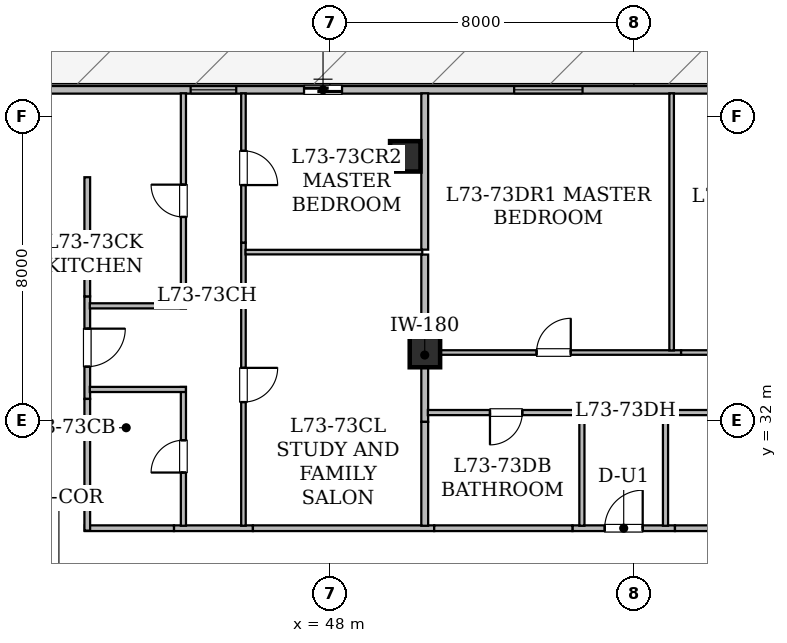
"""IFC4 building model, lengths in metres.
Left out: names, types, materials, properties, quantities, classifications, styles, units other than length and angle.
Written with IfcOpenShell. Run it as: python <this file> out.ifc"""

import sys

from ifc_helpers import new_model, si_unit, direction, frame, frame_2d, origin, origin_2d, place, context, subcontext, project, spatial, rectangle, hollow_rectangle, extrude, element, fill, save


model = new_model("IFC4")
c1 = context("Model", 3, precision=1e-05, world=origin(), true_north=direction((0.0, 1.0)))
c2 = subcontext(c1, "Body", "Model", "MODEL_VIEW")
j1 = project(units=[si_unit("LENGTHUNIT", "METRE"), si_unit("PLANEANGLEUNIT", "RADIAN")], contexts=[c1])
p1 = place(None, origin())
s1 = spatial("IfcSite", under=j1, at=p1, CompositionType="ELEMENT")
p2 = place(p1, origin())
s2 = spatial("IfcBuilding", under=s1, at=p2, CompositionType="ELEMENT")
p3 = place(p2, frame((0.0, 0.0, 286.25)))
s3 = spatial("IfcBuildingStorey", under=s2, at=p3, CompositionType="ELEMENT", Elevation=286.25)
p4 = place(p3, frame((49.983, 38.95, 0.025), z_axis=(0.0, 0.0, 1.0), x_axis=(1.0, 0.0, 0.0)))
e1 = element("IfcColumn", 1, at=p4, inside=s3, PredefinedType="COLUMN", context=c2, shape_type="SweptSolid", body=[
    extrude(hollow_rectangle(XDim=0.8, YDim=0.8, WallThickness=0.04, at=origin_2d()), origin(), (0.0, 0.0, 1.0), 4.175),
])
p5 = place(p3, frame((50.5, 33.8, 0.0), z_axis=(0.0, 0.0, 1.0), x_axis=(1.0, 0.0, 0.0)))
e2 = element("IfcColumn", 2, at=p5, inside=s3, PredefinedType="COLUMN", context=c2, shape_type="SweptSolid", body=[
    extrude(hollow_rectangle(XDim=0.8, YDim=0.8, WallThickness=0.04, at=origin_2d()), origin(), (0.0, 0.0, 1.0), 4.2),
])
p6 = place(p3, frame((28.302, 40.7, 0.0), z_axis=(0.0, 0.0, 1.0), x_axis=(1.0, 0.0, 0.0)))
e3 = element("IfcWall", 3, at=p6, inside=s3, PredefinedType="STANDARD", context=c2, shape_type="SweptSolid", body=[
    extrude(rectangle(XDim=33.457, YDim=0.2, at=frame_2d((16.729, 0.0))), origin(), (0.0, 0.0, 1.0), 3.95),
])
p7 = place(p6, frame((19.017, 0.0, 0.0)))
e4 = element("IfcOpeningElement", 4, at=p7, cuts=e3, PredefinedType="OPENING", context=c2, shape_type="SweptSolid", body=[
    extrude(rectangle(XDim=1.0, YDim=2.15, at=frame_2d((0.5, 1.075))), frame((0.0, 0.11, 0.0), z_axis=(0.0, -1.0, 0.0), x_axis=(1.0, 0.0, 0.0)), (0.0, 0.0, 1.0), 0.22),
])
p8 = place(p6, frame((16.033, 0.0, 0.78)))
e5 = element("IfcOpeningElement", 5, at=p8, cuts=e3, PredefinedType="OPENING", context=c2, shape_type="SweptSolid", body=[
    extrude(rectangle(XDim=1.2, YDim=1.5, at=frame_2d((0.6, 0.75))), frame((0.0, 0.11, 0.0), z_axis=(0.0, -1.0, 0.0), x_axis=(1.0, 0.0, 0.0)), (0.0, 0.0, 1.0), 0.22),
])
p9 = place(p6, frame((24.546, 0.0, 0.85)))
e6 = element("IfcOpeningElement", 6, at=p9, cuts=e3, PredefinedType="OPENING", context=c2, shape_type="SweptSolid", body=[
    extrude(rectangle(XDim=1.8, YDim=0.92, at=frame_2d((0.9, 0.46))), frame((0.0, 0.11, 0.0), z_axis=(0.0, -1.0, 0.0), x_axis=(1.0, 0.0, 0.0)), (0.0, 0.0, 1.0), 0.22),
])
p10 = place(p6, frame((29.781, 0.0, 0.85)))
e7 = element("IfcOpeningElement", 7, at=p10, cuts=e3, PredefinedType="OPENING", context=c2, shape_type="SweptSolid", body=[
    extrude(rectangle(XDim=1.8, YDim=0.92, at=frame_2d((0.9, 0.46))), frame((0.0, 0.11, 0.0), z_axis=(0.0, -1.0, 0.0), x_axis=(1.0, 0.0, 0.0)), (0.0, 0.0, 1.0), 0.22),
])
p11 = place(p3, frame((43.896, 29.165, 0.0), z_axis=(0.0, 0.0, 1.0), x_axis=(1.0, 0.0, 0.0)))
e8 = element("IfcWall", 8, at=p11, inside=s3, PredefinedType="STANDARD", context=c2, shape_type="SweptSolid", body=[
    extrude(rectangle(XDim=2.078, YDim=0.15, at=frame_2d((1.039, 0.0))), origin(), (0.0, 0.0, 1.0), 3.95),
])
p12 = place(p3, frame((41.615, 35.265, 0.0), z_axis=(0.0, 0.0, 1.0), x_axis=(0.0, -1.0, 0.0)))
e9 = element("IfcWall", 9, at=p12, inside=s3, PredefinedType="STANDARD", context=c2, shape_type="SweptSolid", body=[
    extrude(rectangle(XDim=2.698, YDim=0.15, at=frame_2d((1.349, 0.0))), origin(), (0.0, 0.0, 1.0), 3.95),
])
p13 = place(p12, frame((0.849, 0.0, 0.0)))
e10 = element("IfcOpeningElement", 10, at=p13, cuts=e9, PredefinedType="OPENING", context=c2, shape_type="SweptSolid", body=[
    extrude(rectangle(XDim=1.0, YDim=2.15, at=frame_2d((0.5, 1.075))), frame((0.0, 0.085, 0.0), z_axis=(0.0, -1.0, 0.0), x_axis=(1.0, 0.0, 0.0)), (0.0, 0.0, 1.0), 0.17),
])
p14 = place(p3, frame((41.55, 29.165, 0.0), z_axis=(0.0, 0.0, 1.0), x_axis=(1.0, 0.0, 0.0)))
e11 = element("IfcWall", 11, at=p14, inside=s3, PredefinedType="STANDARD", context=c2, shape_type="SweptSolid", body=[
    extrude(rectangle(XDim=2.346, YDim=0.15, at=frame_2d((1.173, 0.0))), origin(), (0.0, 0.0, 1.0), 3.95),
])
p15 = place(p3, frame((41.615, 32.567, 0.0), z_axis=(0.0, 0.0, 1.0), x_axis=(0.0, -1.0, 0.0)))
e12 = element("IfcWall", 12, at=p15, inside=s3, PredefinedType="STANDARD", context=c2, shape_type="SweptSolid", body=[
    extrude(rectangle(XDim=3.465, YDim=0.15, at=frame_2d((1.732, 0.0))), origin(), (0.0, 0.0, 1.0), 3.95),
])
p16 = place(p3, frame((41.615, 38.4, 0.0), z_axis=(0.0, 0.0, 1.0), x_axis=(0.0, -1.0, 0.0)))
e13 = element("IfcWall", 13, at=p16, inside=s3, PredefinedType="STANDARD", context=c2, shape_type="SweptSolid", body=[
    extrude(rectangle(XDim=3.135, YDim=0.15, at=frame_2d((1.567, 0.0))), origin(), (0.0, 0.0, 1.0), 3.245),
])
p17 = place(p3, frame((45.974, 29.165, 0.0), z_axis=(0.0, 0.0, 1.0), x_axis=(1.0, 0.0, 0.0)))
e14 = element("IfcWall", 14, at=p17, inside=s3, PredefinedType="STANDARD", context=c2, shape_type="SweptSolid", body=[
    extrude(rectangle(XDim=4.77, YDim=0.15, at=frame_2d((2.385, 0.0))), origin(), (0.0, 0.0, 1.0), 3.245),
])
p18 = place(p3, frame((54.382, 29.165, 0.0), z_axis=(0.0, 0.0, 1.0), x_axis=(1.0, 0.0, 0.0)))
e15 = element("IfcWall", 15, at=p18, inside=s3, PredefinedType="STANDARD", context=c2, shape_type="SweptSolid", body=[
    extrude(rectangle(XDim=2.698, YDim=0.15, at=frame_2d((1.349, 0.0))), origin(), (0.0, 0.0, 1.0), 3.95),
])
p19 = place(p18, frame((0.849, 0.0, 0.0)))
e16 = element("IfcOpeningElement", 16, at=p19, cuts=e15, PredefinedType="OPENING", context=c2, shape_type="SweptSolid", body=[
    extrude(rectangle(XDim=1.0, YDim=2.15, at=frame_2d((0.5, 1.075))), frame((0.0, 0.085, 0.0), z_axis=(0.0, -1.0, 0.0), x_axis=(1.0, 0.0, 0.0)), (0.0, 0.0, 1.0), 0.17),
])
p20 = place(p3, frame((50.744, 29.165, 0.0), z_axis=(0.0, 0.0, 1.0), x_axis=(1.0, 0.0, 0.0)))
e17 = element("IfcWall", 17, at=p20, inside=s3, PredefinedType="STANDARD", context=c2, shape_type="SweptSolid", body=[
    extrude(rectangle(XDim=3.638, YDim=0.15, at=frame_2d((1.819, 0.0))), origin(), (0.0, 0.0, 1.0), 3.95),
])
p21 = place(p3, frame((57.08, 29.165, 0.0), z_axis=(0.0, 0.0, 1.0), x_axis=(1.0, 0.0, 0.0)))
e18 = element("IfcWall", 18, at=p21, inside=s3, PredefinedType="STANDARD", context=c2, shape_type="SweptSolid", body=[
    extrude(rectangle(XDim=3.61, YDim=0.15, at=frame_2d((1.805, 0.0))), origin(), (0.0, 0.0, 1.0), 3.95),
])
p22 = place(p3, frame((44.145, 29.23, 0.0), z_axis=(0.0, 0.0, 1.0), x_axis=(0.0, 1.0, 0.0)))
e19 = element("IfcWall", 19, at=p22, inside=s3, PredefinedType="PARTITIONING", context=c2, shape_type="SweptSolid", body=[
    extrude(rectangle(XDim=3.651, YDim=0.135, at=frame_2d((1.826, 0.0))), origin(), (0.0, 0.0, 1.0), 3.95),
])
p23 = place(p22, frame((1.4, 0.0, 0.0)))
e20 = element("IfcOpeningElement", 20, at=p23, cuts=e19, PredefinedType="OPENING", context=c2, shape_type="SweptSolid", body=[
    extrude(rectangle(XDim=0.85, YDim=2.1, at=frame_2d((0.425, 1.05))), frame((0.0, 0.077, 0.0), z_axis=(0.0, -1.0, 0.0), x_axis=(1.0, 0.0, 0.0)), (0.0, 0.0, 1.0), 0.155),
])
for number, where, z_axis, x_axis in (
    (21, (44.21, 32.816, 0.0), (0.0, 0.0, 1.0), (-1.0, 0.0, 0.0)),
    (22, (41.682, 35.016, 0.0), (0.0, 0.0, 1.0), (1.0, 0.0, 0.0)),
):
    element("IfcWall", number, at=place(p3, frame(where, z_axis=z_axis, x_axis=x_axis)), inside=s3, PredefinedType="PARTITIONING", context=c2, shape_type="SweptSolid", body=[
        extrude(rectangle(XDim=2.528, YDim=0.135, at=frame_2d((1.264, 0.0))), origin(), (0.0, 0.0, 1.0), 3.95),
    ])
p24 = place(p3, frame((44.145, 34.951, 0.0), z_axis=(0.0, 0.0, 1.0), x_axis=(0.0, 1.0, 0.0)))
e23 = element("IfcWall", 23, at=p24, inside=s3, PredefinedType="PARTITIONING", context=c2, shape_type="SweptSolid", body=[
    extrude(rectangle(XDim=5.657, YDim=0.135, at=frame_2d((2.829, 0.0))), origin(), (0.0, 0.0, 1.0), 3.245),
])
p25 = place(p24, frame((2.404, 0.0, 0.0)))
e24 = element("IfcOpeningElement", 24, at=p25, cuts=e23, PredefinedType="OPENING", context=c2, shape_type="SweptSolid", body=[
    extrude(rectangle(XDim=0.85, YDim=2.1, at=frame_2d((0.425, 1.05))), frame((0.0, 0.077, 0.0), z_axis=(0.0, -1.0, 0.0), x_axis=(1.0, 0.0, 0.0)), (0.0, 0.0, 1.0), 0.155),
])
p26 = place(p3, frame((45.725, 36.679, 0.0), z_axis=(0.0, 0.0, 1.0), x_axis=(0.0, -1.0, 0.0)))
e25 = element("IfcWall", 25, at=p26, inside=s3, PredefinedType="PARTITIONING", context=c2, shape_type="SweptSolid", body=[
    extrude(rectangle(XDim=7.449, YDim=0.12, at=frame_2d((3.725, 0.0))), origin(), (0.0, 0.0, 1.0), 3.245),
])
p27 = place(p26, frame((3.295, 0.0, 0.0)))
e26 = element("IfcOpeningElement", 26, at=p27, cuts=e25, PredefinedType="OPENING", context=c2, shape_type="SweptSolid", body=[
    extrude(rectangle(XDim=0.9, YDim=2.1, at=frame_2d((0.45, 1.05))), frame((0.0, 0.07, 0.0), z_axis=(0.0, -1.0, 0.0), x_axis=(1.0, 0.0, 0.0)), (0.0, 0.0, 1.0), 0.14),
])
p28 = place(p3, frame((45.725, 40.608, 0.0), z_axis=(0.0, 0.0, 1.0), x_axis=(0.0, -1.0, 0.0)))
e27 = element("IfcWall", 27, at=p28, inside=s3, PredefinedType="PARTITIONING", context=c2, shape_type="SweptSolid", body=[
    extrude(rectangle(XDim=3.929, YDim=0.12, at=frame_2d((1.964, 0.0))), origin(), (0.0, 0.0, 1.0), 3.407),
])
p29 = place(p28, frame((1.514, 0.0, 0.0)))
e28 = element("IfcOpeningElement", 28, at=p29, cuts=e27, PredefinedType="OPENING", context=c2, shape_type="SweptSolid", body=[
    extrude(rectangle(XDim=0.9, YDim=2.1, at=frame_2d((0.45, 1.05))), frame((0.0, 0.07, 0.0), z_axis=(0.0, -1.0, 0.0), x_axis=(1.0, 0.0, 0.0)), (0.0, 0.0, 1.0), 0.14),
])
p30 = place(p3, frame((45.779, 36.43, 0.0), z_axis=(0.0, 0.0, 1.0), x_axis=(1.0, 0.0, 0.0)))
e29 = element("IfcWall", 29, at=p30, inside=s3, PredefinedType="PARTITIONING", context=c2, shape_type="SweptSolid", body=[
    extrude(rectangle(XDim=4.651, YDim=0.12, at=frame_2d((2.325, 0.0))), origin(), (0.0, 0.0, 1.0), 3.245),
])
p31 = place(p3, frame((50.495, 34.032, 0.0), z_axis=(0.0, 0.0, 1.0), x_axis=(0.0, -1.0, 0.0)))
e30 = element("IfcWall", 30, at=p31, inside=s3, PredefinedType="STANDARD", context=c2, shape_type="SweptSolid", body=[
    extrude(rectangle(XDim=2.069, YDim=0.18, at=frame_2d((1.035, 0.0))), origin(), (0.0, 0.0, 1.0), 3.245),
])
p32 = place(p3, frame((50.495, 31.963, 0.0), z_axis=(0.0, 0.0, 1.0), x_axis=(0.0, -1.0, 0.0)))
e31 = element("IfcWall", 31, at=p32, inside=s3, PredefinedType="STANDARD", context=c2, shape_type="SweptSolid", body=[
    extrude(rectangle(XDim=2.733, YDim=0.18, at=frame_2d((1.366, 0.0))), origin(), (0.0, 0.0, 1.0), 3.245),
])
p33 = place(p3, frame((50.495, 36.365, 0.0), z_axis=(0.0, 0.0, 1.0), x_axis=(0.0, -1.0, 0.0)))
e32 = element("IfcWall", 32, at=p33, inside=s3, PredefinedType="STANDARD", context=c2, shape_type="SweptSolid", body=[
    extrude(rectangle(XDim=2.333, YDim=0.18, at=frame_2d((1.167, 0.0))), origin(), (0.0, 0.0, 1.0), 3.245),
])
p34 = place(p3, frame((50.495, 40.608, 0.0), z_axis=(0.0, 0.0, 1.0), x_axis=(0.0, -1.0, 0.0)))
e33 = element("IfcWall", 33, at=p34, inside=s3, PredefinedType="STANDARD", context=c2, shape_type="SweptSolid", body=[
    extrude(rectangle(XDim=4.113, YDim=0.18, at=frame_2d((2.056, 0.0))), origin(), (0.0, 0.0, 1.0), 3.245),
])
p35 = place(p3, frame((54.631, 29.23, 0.0), z_axis=(0.0, 0.0, 1.0), x_axis=(0.0, 1.0, 0.0)))
e34 = element("IfcWall", 34, at=p35, inside=s3, PredefinedType="PARTITIONING", context=c2, shape_type="SweptSolid", body=[
    extrude(rectangle(XDim=3.043, YDim=0.135, at=frame_2d((1.521, 0.0))), origin(), (0.0, 0.0, 1.0), 3.95),
])
p36 = place(p3, frame((54.696, 32.208, 0.0), z_axis=(0.0, 0.0, 1.0), x_axis=(-1.0, 0.0, 0.0)))
e35 = element("IfcWall", 35, at=p36, inside=s3, PredefinedType="PARTITIONING", context=c2, shape_type="SweptSolid", body=[
    extrude(rectangle(XDim=4.119, YDim=0.135, at=frame_2d((2.06, 0.0))), origin(), (0.0, 0.0, 1.0), 3.245),
])
p37 = place(p36, frame((1.634, 0.0, 0.0)))
e36 = element("IfcOpeningElement", 36, at=p37, cuts=e35, PredefinedType="OPENING", context=c2, shape_type="SweptSolid", body=[
    extrude(rectangle(XDim=0.85, YDim=2.1, at=frame_2d((0.425, 1.05))), frame((0.0, 0.077, 0.0), z_axis=(0.0, -1.0, 0.0), x_axis=(1.0, 0.0, 0.0)), (0.0, 0.0, 1.0), 0.155),
])
p38 = place(p3, frame((61.761, 32.208, 0.0), z_axis=(0.0, 0.0, 1.0), x_axis=(-1.0, 0.0, 0.0)))
e37 = element("IfcWall", 37, at=p38, inside=s3, PredefinedType="PARTITIONING", context=c2, shape_type="SweptSolid", body=[
    extrude(rectangle(XDim=4.995, YDim=0.135, at=frame_2d((2.498, 0.0))), origin(), (0.0, 0.0, 1.0), 3.95),
])
p39 = place(p38, frame((2.073, 0.0, 0.0)))
e38 = element("IfcOpeningElement", 38, at=p39, cuts=e37, PredefinedType="OPENING", context=c2, shape_type="SweptSolid", body=[
    extrude(rectangle(XDim=0.85, YDim=2.1, at=frame_2d((0.425, 1.05))), frame((0.0, 0.077, 0.0), z_axis=(0.0, -1.0, 0.0), x_axis=(1.0, 0.0, 0.0)), (0.0, 0.0, 1.0), 0.155),
])
p40 = place(p3, frame((56.831, 32.273, 0.0), z_axis=(0.0, 0.0, 1.0), x_axis=(0.0, -1.0, 0.0)))
e39 = element("IfcWall", 39, at=p40, inside=s3, PredefinedType="PARTITIONING", context=c2, shape_type="SweptSolid", body=[
    extrude(rectangle(XDim=3.043, YDim=0.135, at=frame_2d((1.521, 0.0))), origin(), (0.0, 0.0, 1.0), 3.95),
])
p41 = place(p3, frame((50.577, 33.788, 0.0), z_axis=(0.0, 0.0, 1.0), x_axis=(1.0, 0.0, 0.0)))
e40 = element("IfcWall", 40, at=p41, inside=s3, PredefinedType="PARTITIONING", context=c2, shape_type="SweptSolid", body=[
    extrude(rectangle(XDim=6.664, YDim=0.12, at=frame_2d((3.332, 0.0))), origin(), (0.0, 0.0, 1.0), 3.245),
])
p42 = place(p41, frame((2.861, 0.0, 0.0)))
e41 = element("IfcOpeningElement", 41, at=p42, cuts=e40, PredefinedType="OPENING", context=c2, shape_type="SweptSolid", body=[
    extrude(rectangle(XDim=0.9, YDim=2.1, at=frame_2d((0.45, 1.05))), frame((0.0, 0.07, 0.0), z_axis=(0.0, -1.0, 0.0), x_axis=(1.0, 0.0, 0.0)), (0.0, 0.0, 1.0), 0.14),
])
p43 = place(p3, frame((57.241, 33.788, 0.0), z_axis=(0.0, 0.0, 1.0), x_axis=(1.0, 0.0, 0.0)))
e42 = element("IfcWall", 42, at=p43, inside=s3, PredefinedType="PARTITIONING", context=c2, shape_type="SweptSolid", body=[
    extrude(rectangle(XDim=7.567, YDim=0.12, at=frame_2d((3.784, 0.0))), origin(), (0.0, 0.0, 1.0), 3.245),
])
p44 = place(p43, frame((3.333, 0.0, 0.0)))
e43 = element("IfcOpeningElement", 43, at=p44, cuts=e42, PredefinedType="OPENING", context=c2, shape_type="SweptSolid", body=[
    extrude(rectangle(XDim=0.9, YDim=2.1, at=frame_2d((0.45, 1.05))), frame((0.0, 0.07, 0.0), z_axis=(0.0, -1.0, 0.0), x_axis=(1.0, 0.0, 0.0)), (0.0, 0.0, 1.0), 0.14),
])
p45 = place(p3, frame((56.992, 40.608, 0.0), z_axis=(0.0, 0.0, 1.0), x_axis=(0.0, -1.0, 0.0)))
e44 = element("IfcWall", 44, at=p45, inside=s3, PredefinedType="PARTITIONING", context=c2, shape_type="SweptSolid", body=[
    extrude(rectangle(XDim=6.766, YDim=0.12, at=frame_2d((3.383, 0.0))), origin(), (0.0, 0.0, 1.0), 3.245),
])
p46 = place(p7, origin())
e45 = element("IfcDoor", 45, at=p46, inside=s3, OperationType="SLIDING_TO_LEFT", PredefinedType="DOOR", context=c2, shape_type="SweptSolid", body=[
    extrude(rectangle(XDim=1.0, YDim=2.15, at=frame_2d((0.5, 1.075))), frame((0.0, 0.025, 0.0), z_axis=(0.0, -1.0, 0.0), x_axis=(1.0, 0.0, 0.0)), (0.0, 0.0, 1.0), 0.05),
])
fill(e4, e45)
p47 = place(p8, origin())
e46 = element("IfcWindow", 46, at=p47, inside=s3, PartitioningType="SINGLE_PANEL", PredefinedType="WINDOW", context=c2, shape_type="SweptSolid", body=[
    extrude(rectangle(XDim=1.2, YDim=1.5, at=frame_2d((0.6, 0.75))), frame((0.0, 0.03, 0.0), z_axis=(0.0, -1.0, 0.0), x_axis=(1.0, 0.0, 0.0)), (0.0, 0.0, 1.0), 0.06),
])
fill(e5, e46)
p48 = place(p9, origin())
e47 = element("IfcWindow", 47, at=p48, inside=s3, PartitioningType="SINGLE_PANEL", PredefinedType="WINDOW", context=c2, shape_type="SweptSolid", body=[
    extrude(rectangle(XDim=1.8, YDim=0.92, at=frame_2d((0.9, 0.46))), frame((0.0, 0.03, 0.0), z_axis=(0.0, -1.0, 0.0), x_axis=(1.0, 0.0, 0.0)), (0.0, 0.0, 1.0), 0.06),
])
fill(e6, e47)
p49 = place(p13, origin())
e48 = element("IfcDoor", 48, at=p49, inside=s3, OperationType="SINGLE_SWING_LEFT", PredefinedType="DOOR", context=c2, shape_type="SweptSolid", body=[
    extrude(rectangle(XDim=1.0, YDim=2.15, at=frame_2d((0.5, 1.075))), frame((0.0, 0.025, 0.0), z_axis=(0.0, -1.0, 0.0), x_axis=(1.0, 0.0, 0.0)), (0.0, 0.0, 1.0), 0.05),
])
fill(e10, e48)
p50 = place(p19, origin())
e49 = element("IfcDoor", 49, at=p50, inside=s3, OperationType="SINGLE_SWING_RIGHT", PredefinedType="DOOR", context=c2, shape_type="SweptSolid", body=[
    extrude(rectangle(XDim=1.0, YDim=2.15, at=frame_2d((0.5, 1.075))), frame((0.0, 0.025, 0.0), z_axis=(0.0, -1.0, 0.0), x_axis=(1.0, 0.0, 0.0)), (0.0, 0.0, 1.0), 0.05),
])
fill(e16, e49)
p51 = place(p23, origin())
e50 = element("IfcDoor", 50, at=p51, inside=s3, OperationType="SINGLE_SWING_LEFT", PredefinedType="DOOR", context=c2, shape_type="SweptSolid", body=[
    extrude(rectangle(XDim=0.85, YDim=2.1, at=frame_2d((0.425, 1.05))), frame((0.0, 0.025, 0.0), z_axis=(0.0, -1.0, 0.0), x_axis=(1.0, 0.0, 0.0)), (0.0, 0.0, 1.0), 0.05),
])
fill(e20, e50)
p52 = place(p25, origin())
e51 = element("IfcDoor", 51, at=p52, inside=s3, OperationType="SINGLE_SWING_RIGHT", PredefinedType="DOOR", context=c2, shape_type="SweptSolid", body=[
    extrude(rectangle(XDim=0.85, YDim=2.1, at=frame_2d((0.425, 1.05))), frame((0.0, 0.025, 0.0), z_axis=(0.0, -1.0, 0.0), x_axis=(1.0, 0.0, 0.0)), (0.0, 0.0, 1.0), 0.05),
])
fill(e24, e51)
p53 = place(p27, origin())
e52 = element("IfcDoor", 52, at=p53, inside=s3, OperationType="SINGLE_SWING_LEFT", PredefinedType="DOOR", context=c2, shape_type="SweptSolid", body=[
    extrude(rectangle(XDim=0.9, YDim=2.1, at=frame_2d((0.45, 1.05))), frame((0.0, 0.025, 0.0), z_axis=(0.0, -1.0, 0.0), x_axis=(1.0, 0.0, 0.0)), (0.0, 0.0, 1.0), 0.05),
])
fill(e26, e52)
p54 = place(p29, origin())
e53 = element("IfcDoor", 53, at=p54, inside=s3, OperationType="SINGLE_SWING_RIGHT", PredefinedType="DOOR", context=c2, shape_type="SweptSolid", body=[
    extrude(rectangle(XDim=0.9, YDim=2.1, at=frame_2d((0.45, 1.05))), frame((0.0, 0.025, 0.0), z_axis=(0.0, -1.0, 0.0), x_axis=(1.0, 0.0, 0.0)), (0.0, 0.0, 1.0), 0.05),
])
fill(e28, e53)
p55 = place(p37, origin())
e54 = element("IfcDoor", 54, at=p55, inside=s3, OperationType="SINGLE_SWING_RIGHT", PredefinedType="DOOR", context=c2, shape_type="SweptSolid", body=[
    extrude(rectangle(XDim=0.85, YDim=2.1, at=frame_2d((0.425, 1.05))), frame((0.0, 0.025, 0.0), z_axis=(0.0, -1.0, 0.0), x_axis=(1.0, 0.0, 0.0)), (0.0, 0.0, 1.0), 0.05),
])
fill(e36, e54)
p56 = place(p42, origin())
e55 = element("IfcDoor", 55, at=p56, inside=s3, OperationType="SINGLE_SWING_RIGHT", PredefinedType="DOOR", context=c2, shape_type="SweptSolid", body=[
    extrude(rectangle(XDim=0.9, YDim=2.1, at=frame_2d((0.45, 1.05))), frame((0.0, 0.025, 0.0), z_axis=(0.0, -1.0, 0.0), x_axis=(1.0, 0.0, 0.0)), (0.0, 0.0, 1.0), 0.05),
])
fill(e41, e55)
save(model, sys.argv[1])
